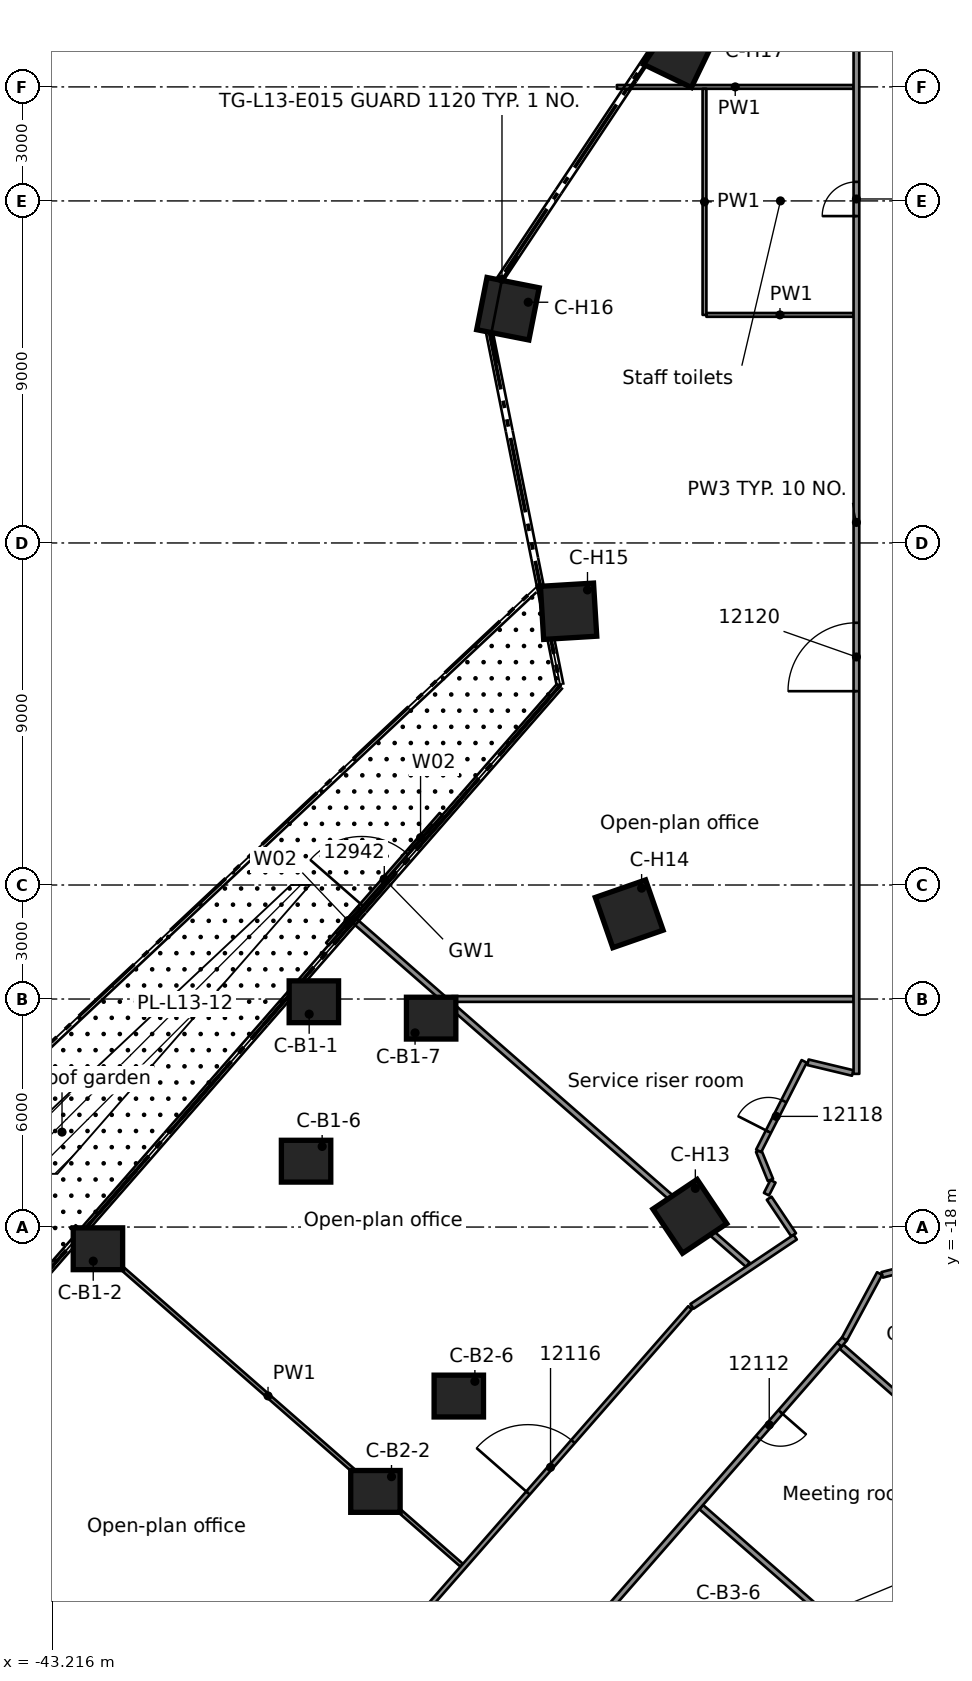
"""IFC4 building model, lengths in metres.
Left out: names, types, materials, properties, quantities, classifications, styles, units other than length and angle.
Written with IfcOpenShell. Run it as: python <this file> out.ifc"""

import sys

from ifc_helpers import new_model, si_unit, direction, frame, frame_2d, origin, origin_2d, place, context, subcontext, project, spatial, rectangle, extrude, element, fill, save


model = new_model("IFC4")
c1 = context("Model", 3, precision=1e-05, world=origin(), true_north=direction((0.0, 1.0)))
c2 = subcontext(c1, "Body", "Model", "MODEL_VIEW")
j1 = project(units=[si_unit("LENGTHUNIT", "METRE"), si_unit("PLANEANGLEUNIT", "RADIAN")], contexts=[c1])
p1 = place(None, origin())
s1 = spatial("IfcSite", under=j1, at=p1, CompositionType="ELEMENT")
p2 = place(p1, origin())
s2 = spatial("IfcBuilding", under=s1, at=p2, CompositionType="ELEMENT")
p3 = place(p2, frame((0.0, 0.0, 58.8)))
s3 = spatial("IfcBuildingStorey", under=s2, at=p3, CompositionType="ELEMENT", Elevation=58.8)
for number, where, z_axis, x_axis in (
    (1, (-36.327, -12.072, 0.0), (0.0, 0.0, 1.0), (1.0, 0.0, 0.0)),
    (2, (-42.009, -18.571, 0.0), (0.0, 0.0, 1.0), (1.0, 0.0, 0.0)),
    (3, (-36.532, -16.267, 0.0), (0.0, 0.0, 1.0), (1.0, 0.0, 0.0)),
    (4, (-33.241, -12.503, 0.0), (0.0, 0.0, 1.0), (1.0, 0.0, 0.0)),
    (5, (-34.707, -24.956, 0.0), (0.0, 0.0, 1.0), (1.0, 0.0, 0.0)),
    (6, (-32.513, -22.447, 0.0), (0.0, 0.0, 1.0), (1.0, 0.0, 0.0)),
):
    element("IfcColumn", number, at=place(p3, frame(where, z_axis=z_axis, x_axis=x_axis)), inside=s3, PredefinedType="COLUMN", context=c2, shape_type="SweptSolid", body=[
        extrude(rectangle(XDim=1.3, YDim=1.1, at=origin_2d()), origin(), (0.0, 0.0, 1.0), 3.5),
    ])
for number, where, z_axis, x_axis in (
    (7, (-26.434, -17.718, 0.0), (0.0, 0.0, 1.0), (-0.831, -0.557, 0.0)),
    (8, (-28.029, -9.758, 0.0), (0.0, 0.0, 1.0), (-0.944, -0.329, 0.0)),
    (9, (-29.624, -1.797, 0.0), (0.0, 0.0, 1.0), (-0.998, -0.061, 0.0)),
    (10, (-31.22, 6.163, 0.0), (0.0, 0.0, 1.0), (-0.981, 0.194, 0.0)),
    (11, (-26.719, 12.92, 0.0), (0.0, 0.0, 1.0), (-0.9, 0.435, 0.0)),
):
    element("IfcColumn", number, at=place(p3, frame(where, z_axis=z_axis, x_axis=x_axis)), inside=s3, PredefinedType="COLUMN", context=c2, shape_type="SweptSolid", body=[
        extrude(rectangle(XDim=1.4, YDim=1.4, at=origin_2d()), origin(), (0.0, 0.0, 1.0), 3.5),
    ])
p4 = place(p3, frame((-35.968, -10.553, 0.0), z_axis=(0.0, 0.0, 1.0), x_axis=(0.658272283298, 0.752779915408, 0.0)))
e12 = element("IfcWall", 12, at=p4, inside=s3, PredefinedType="STANDARD", context=c2, shape_type="SweptSolid", body=[
    extrude(rectangle(XDim=4.539, YDim=0.1, at=frame_2d((2.27, 0.0))), origin(), (0.0, 0.0, 1.0), 3.1),
])
p5 = place(p4, frame((1.369, 0.0, 0.0)))
e13 = element("IfcOpeningElement", 13, at=p5, cuts=e12, PredefinedType="OPENING", context=c2, shape_type="SweptSolid", body=[
    extrude(rectangle(XDim=1.8, YDim=2.4, at=frame_2d((0.9, 1.2))), frame((0.0, 0.06, 0.0), z_axis=(0.0, -1.0, 0.0), x_axis=(1.0, 0.0, 0.0)), (0.0, 0.0, 1.0), 0.12),
])
p6 = place(p4, frame((0.369, 0.0, 0.0)))
e14 = element("IfcOpeningElement", 14, at=p6, cuts=e12, PredefinedType="OPENING", context=c2, shape_type="SweptSolid", body=[
    extrude(rectangle(XDim=0.9, YDim=2.4, at=frame_2d((0.45, 1.2))), frame((0.0, 0.06, 0.0), z_axis=(0.0, -1.0, 0.0), x_axis=(1.0, 0.0, 0.0)), (0.0, 0.0, 1.0), 0.12),
])
p7 = place(p4, frame((3.269, 0.0, 0.0)))
e15 = element("IfcOpeningElement", 15, at=p7, cuts=e12, PredefinedType="OPENING", context=c2, shape_type="SweptSolid", body=[
    extrude(rectangle(XDim=0.9, YDim=2.4, at=frame_2d((0.45, 1.2))), frame((0.0, 0.06, 0.0), z_axis=(0.0, -1.0, 0.0), x_axis=(1.0, 0.0, 0.0)), (0.0, 0.0, 1.0), 0.12),
])
p8 = place(p3, frame((-24.346, -17.242, 0.0), z_axis=(0.0, 0.0, 1.0), x_axis=(0.55625636637, -0.831010742935, 0.0)))
e16 = element("IfcWall", 16, at=p8, inside=s3, PredefinedType="PARTITIONING", context=c2, shape_type="SweptSolid", body=[
    extrude(rectangle(XDim=1.158, YDim=0.15, at=frame_2d((0.579, 0.0))), origin(), (0.0, 0.0, 1.0), 3.08),
])
p9 = place(p3, frame((-48.313, -24.572, 0.0), z_axis=(0.0, 0.0, 1.0), x_axis=(0.752771849231, -0.658281507415, 0.0)))
e17 = element("IfcWall", 17, at=p9, inside=s3, PredefinedType="PARTITIONING", context=c2, shape_type="SweptSolid", body=[
    extrude(rectangle(XDim=13.482, YDim=0.1, at=frame_2d((6.741, 0.0))), origin(), (0.0, 0.0, 1.0), 3.08),
])
p10 = place(p3, frame((-42.628, -17.988, 0.0), z_axis=(0.0, 0.0, 1.0), x_axis=(0.752806813439, -0.658241522269, 0.0)))
e18 = element("IfcWall", 18, at=p10, inside=s3, PredefinedType="PARTITIONING", context=c2, shape_type="SweptSolid", body=[
    extrude(rectangle(XDim=13.536, YDim=0.1, at=frame_2d((6.768, 0.0))), origin(), (0.0, 0.0, 1.0), 3.08),
])
p11 = place(p3, frame((-26.134, -25.368, 0.0), z_axis=(0.0, 0.0, 1.0), x_axis=(0.75275458924, -0.6583012444, 0.0)))
e19 = element("IfcWall", 19, at=p11, inside=s3, PredefinedType="PARTITIONING", context=c2, shape_type="SweptSolid", body=[
    extrude(rectangle(XDim=5.95, YDim=0.15, at=frame_2d((2.975, 0.0))), origin(), (0.0, 0.0, 1.0), 3.08),
])
p12 = place(p3, frame((-35.281, -9.921, 0.0), z_axis=(0.0, 0.0, 1.0), x_axis=(0.752809357725, -0.658238612452, 0.0)))
e20 = element("IfcWall", 20, at=p12, inside=s3, PredefinedType="PARTITIONING", context=c2, shape_type="SweptSolid", body=[
    extrude(rectangle(XDim=13.778, YDim=0.15, at=frame_2d((6.889, 0.0))), origin(), (0.0, 0.0, 1.0), 3.08),
])
p13 = place(p3, frame((-22.444, -21.147, 0.0), z_axis=(0.0, 0.0, 1.0), x_axis=(0.75277438398, -0.658278608815, 0.0)))
e21 = element("IfcWall", 21, at=p13, inside=s3, PredefinedType="PARTITIONING", context=c2, shape_type="SweptSolid", body=[
    extrude(rectangle(XDim=5.431, YDim=0.15, at=frame_2d((2.715, 0.0))), origin(), (0.0, 0.0, 1.0), 3.08),
])
p14 = place(p3, frame((-24.623, -15.996, 0.0), z_axis=(0.0, 0.0, 1.0), x_axis=(0.376274056367, -0.92650841038, 0.0)))
e22 = element("IfcWall", 22, at=p14, inside=s3, PredefinedType="PARTITIONING", context=c2, shape_type="SweptSolid", body=[
    extrude(rectangle(XDim=0.827, YDim=0.15, at=frame_2d((0.413, 0.0))), origin(), (0.0, 0.0, 1.0), 3.08),
])
p15 = place(p3, frame((-21.373, -19.258, 0.0), z_axis=(0.0, 0.0, 1.0), x_axis=(0.96864217239, 0.248459940165, 0.0)))
e23 = element("IfcWall", 23, at=p15, inside=s3, PredefinedType="PARTITIONING", context=c2, shape_type="SweptSolid", body=[
    extrude(rectangle(XDim=0.833, YDim=0.15, at=frame_2d((0.417, 0.0))), origin(), (0.0, 0.0, 1.0), 3.08),
])
p16 = place(p3, frame((-23.325, -13.664, 0.0), z_axis=(0.0, 0.0, 1.0), x_axis=(0.972436756549, -0.233166795477, 0.0)))
e24 = element("IfcWall", 24, at=p16, inside=s3, PredefinedType="PARTITIONING", context=c2, shape_type="SweptSolid", body=[
    extrude(rectangle(XDim=1.209, YDim=0.15, at=frame_2d((0.605, 0.0))), origin(), (0.0, 0.0, 1.0), 3.08),
])
p17 = place(p3, frame((-32.705, -12.0, 0.0), z_axis=(0.0, 0.0, 1.0), x_axis=(1.0, 0.0, 0.0)))
e25 = element("IfcWall", 25, at=p17, inside=s3, PredefinedType="PARTITIONING", context=c2, shape_type="SweptSolid", body=[
    extrude(rectangle(XDim=10.58, YDim=0.15, at=frame_2d((5.29, 0.0))), origin(), (0.0, 0.0, 1.0), 3.08),
])
p18 = place(p3, frame((-25.998, 6.001, 0.0), z_axis=(0.0, 0.0, 1.0), x_axis=(1.0, 0.0, 0.0)))
e26 = element("IfcWall", 26, at=p18, inside=s3, PredefinedType="PARTITIONING", context=c2, shape_type="SweptSolid", body=[
    extrude(rectangle(XDim=3.873, YDim=0.1, at=frame_2d((1.937, 0.0))), origin(), (0.0, 0.0, 1.0), 3.08),
])
p19 = place(p3, frame((-28.353, 12.0, 0.0), z_axis=(0.0, 0.0, 1.0), x_axis=(1.0, 0.0, 0.0)))
e27 = element("IfcWall", 27, at=p19, inside=s3, PredefinedType="PARTITIONING", context=c2, shape_type="SweptSolid", body=[
    extrude(rectangle(XDim=6.228, YDim=0.1, at=frame_2d((3.114, 0.0))), origin(), (0.0, 0.0, 1.0), 3.08),
])
p20 = place(p3, frame((-26.377, -20.087, 0.0), z_axis=(0.0, 0.0, 1.0), x_axis=(0.830715782385, 0.55669676566, 0.0)))
e28 = element("IfcWall", 28, at=p20, inside=s3, PredefinedType="PARTITIONING", context=c2, shape_type="SweptSolid", body=[
    extrude(rectangle(XDim=3.271, YDim=0.15, at=frame_2d((1.635, 0.0))), origin(), (0.0, 0.0, 1.0), 3.08),
])
p21 = place(p3, frame((-15.416, -27.733, 0.0), z_axis=(0.0, 0.0, 1.0), x_axis=(-0.658232849435, -0.75281439673, 0.0)))
e29 = element("IfcWall", 29, at=p21, inside=s3, PredefinedType="PARTITIONING", context=c2, shape_type="SweptSolid", body=[
    extrude(rectangle(XDim=19.274, YDim=0.125, at=frame_2d((9.637, 0.0))), origin(), (0.0, 0.0, 1.0), 3.08),
])
p22 = place(p21, frame((1.351, 0.0, 0.0)))
e30 = element("IfcOpeningElement", 30, at=p22, cuts=e29, PredefinedType="OPENING", context=c2, shape_type="SweptSolid", body=[
    extrude(rectangle(XDim=0.9, YDim=2.1, at=frame_2d((0.45, 1.05))), frame((0.0, 0.073, 0.0), z_axis=(0.0, -1.0, 0.0), x_axis=(1.0, 0.0, 0.0)), (0.0, 0.0, 1.0), 0.145),
])
p23 = place(p21, frame((14.425, 0.0, 0.0)))
e31 = element("IfcOpeningElement", 31, at=p23, cuts=e29, PredefinedType="OPENING", context=c2, shape_type="SweptSolid", body=[
    extrude(rectangle(XDim=0.9, YDim=2.1, at=frame_2d((0.45, 1.05))), frame((0.0, 0.073, 0.0), z_axis=(0.0, -1.0, 0.0), x_axis=(1.0, 0.0, 0.0)), (0.0, 0.0, 1.0), 0.145),
])
p24 = place(p3, frame((-30.815, -39.873, 0.0), z_axis=(0.0, 0.0, 1.0), x_axis=(0.658330873818, 0.752728676601, 0.0)))
e32 = element("IfcWall", 32, at=p24, inside=s3, PredefinedType="PARTITIONING", context=c2, shape_type="SweptSolid", body=[
    extrude(rectangle(XDim=18.805, YDim=0.15, at=frame_2d((9.402, 0.0))), origin(), (0.0, 0.0, 1.0), 3.08),
])
p25 = place(p24, frame((11.778, 0.0, 0.0)))
e33 = element("IfcOpeningElement", 33, at=p25, cuts=e32, PredefinedType="OPENING", context=c2, shape_type="SweptSolid", body=[
    extrude(rectangle(XDim=0.9, YDim=2.1, at=frame_2d((0.45, 1.05))), frame((0.0, 0.085, 0.0), z_axis=(0.0, -1.0, 0.0), x_axis=(1.0, 0.0, 0.0)), (0.0, 0.0, 1.0), 0.17),
])
p26 = place(p3, frame((-22.5, -21.098, 0.0), z_axis=(0.0, 0.0, 1.0), x_axis=(0.659354460112, 0.751832225919, 0.0)))
e34 = element("IfcWall", 34, at=p26, inside=s3, PredefinedType="PARTITIONING", context=c2, shape_type="SweptSolid", body=[
    extrude(rectangle(XDim=0.203, YDim=0.15, at=frame_2d((0.102, 0.0))), origin(), (0.0, 0.0, 1.0), 3.08),
])
p27 = place(p3, frame((-22.501, -21.097, 0.0), z_axis=(0.0, 0.0, 1.0), x_axis=(-0.658166451888, -0.752872447104, 0.0)))
e35 = element("IfcWall", 35, at=p27, inside=s3, PredefinedType="PARTITIONING", context=c2, shape_type="SweptSolid", body=[
    extrude(rectangle(XDim=19.427, YDim=0.15, at=frame_2d((9.713, 0.0))), origin(), (0.0, 0.0, 1.0), 3.08),
])
p28 = place(p27, frame((2.35, 0.0, 0.0)))
e36 = element("IfcOpeningElement", 36, at=p28, cuts=e35, PredefinedType="OPENING", context=c2, shape_type="SweptSolid", body=[
    extrude(rectangle(XDim=0.9, YDim=2.1, at=frame_2d((0.45, 1.05))), frame((0.0, 0.085, 0.0), z_axis=(0.0, -1.0, 0.0), x_axis=(1.0, 0.0, 0.0)), (0.0, 0.0, 1.0), 0.17),
])
p29 = place(p27, frame((14.757, 0.0, 0.0)))
e37 = element("IfcOpeningElement", 37, at=p29, cuts=e35, PredefinedType="OPENING", context=c2, shape_type="SweptSolid", body=[
    extrude(rectangle(XDim=0.9, YDim=2.1, at=frame_2d((0.45, 1.05))), frame((0.0, 0.085, 0.0), z_axis=(0.0, -1.0, 0.0), x_axis=(1.0, 0.0, 0.0)), (0.0, 0.0, 1.0), 0.17),
])
p30 = place(p3, frame((-41.737, -37.628, 0.0), z_axis=(0.0, 0.0, 1.0), x_axis=(0.658317287272, 0.752740559076, 0.0)))
e38 = element("IfcWall", 38, at=p30, inside=s3, PredefinedType="PARTITIONING", context=c2, shape_type="SweptSolid", body=[
    extrude(rectangle(XDim=23.255, YDim=0.125, at=frame_2d((11.627, 0.0))), origin(), (0.0, 0.0, 1.0), 3.08),
])
p31 = place(p30, frame((16.778, 0.0, 0.0)))
e39 = element("IfcOpeningElement", 39, at=p31, cuts=e38, PredefinedType="OPENING", context=c2, shape_type="SweptSolid", body=[
    extrude(rectangle(XDim=1.8, YDim=2.1, at=frame_2d((0.9, 1.05))), frame((0.0, 0.073, 0.0), z_axis=(0.0, -1.0, 0.0), x_axis=(1.0, 0.0, 0.0)), (0.0, 0.0, 1.0), 0.145),
])
p32 = place(p30, frame((9.35, 0.0, 0.0)))
e40 = element("IfcOpeningElement", 40, at=p32, cuts=e38, PredefinedType="OPENING", context=c2, shape_type="SweptSolid", body=[
    extrude(rectangle(XDim=1.1, YDim=2.1, at=frame_2d((0.55, 1.05))), frame((0.0, 0.073, 0.0), z_axis=(0.0, -1.0, 0.0), x_axis=(1.0, 0.0, 0.0)), (0.0, 0.0, 1.0), 0.145),
])
p33 = place(p3, frame((-22.366, -20.945, 0.0), z_axis=(0.0, 0.0, 1.0), x_axis=(0.473846511914, 0.880607451221, 0.0)))
e41 = element("IfcWall", 41, at=p33, inside=s3, PredefinedType="PARTITIONING", context=c2, shape_type="SweptSolid", body=[
    extrude(rectangle(XDim=1.954, YDim=0.15, at=frame_2d((0.977, 0.0))), origin(), (0.0, 0.0, 1.0), 3.08),
])
p34 = place(p3, frame((-24.623, -15.996, 0.0), z_axis=(0.0, 0.0, 1.0), x_axis=(0.453225530358, 0.891395882104, 0.0)))
e42 = element("IfcWall", 42, at=p34, inside=s3, PredefinedType="PARTITIONING", context=c2, shape_type="SweptSolid", body=[
    extrude(rectangle(XDim=2.643, YDim=0.15, at=frame_2d((1.322, 0.0))), origin(), (0.0, 0.0, 1.0), 3.08),
])
p35 = place(p34, frame((0.569, 0.0, 0.0)))
e43 = element("IfcOpeningElement", 43, at=p35, cuts=e42, PredefinedType="OPENING", context=c2, shape_type="SweptSolid", body=[
    extrude(rectangle(XDim=0.9, YDim=2.1, at=frame_2d((0.45, 1.05))), frame((0.0, 0.085, 0.0), z_axis=(0.0, -1.0, 0.0), x_axis=(1.0, 0.0, 0.0)), (0.0, 0.0, 1.0), 0.17),
])
p36 = place(p3, frame((-24.417, -17.135, 0.0), z_axis=(0.0, 0.0, 1.0), x_axis=(0.452087427058, 0.891973630942, 0.0)))
e44 = element("IfcWall", 44, at=p36, inside=s3, PredefinedType="PARTITIONING", context=c2, shape_type="SweptSolid", body=[
    extrude(rectangle(XDim=0.38, YDim=0.15, at=frame_2d((0.19, 0.0))), origin(), (0.0, 0.0, 1.0), 3.08),
])
p37 = place(p3, frame((-22.05, -13.969, 0.0), z_axis=(0.0, 0.0, 1.0), x_axis=(0.0, 1.0, 0.0)))
e45 = element("IfcWall", 45, at=p37, inside=s3, PredefinedType="PARTITIONING", context=c2, shape_type="SweptSolid", body=[
    extrude(rectangle(XDim=29.02, YDim=0.15, at=frame_2d((14.51, 0.0))), origin(), (0.0, 0.0, 1.0), 3.08),
])
p38 = place(p37, frame((10.069, 0.0, 0.0)))
e46 = element("IfcOpeningElement", 46, at=p38, cuts=e45, PredefinedType="OPENING", context=c2, shape_type="SweptSolid", body=[
    extrude(rectangle(XDim=1.8, YDim=2.1, at=frame_2d((0.9, 1.05))), frame((0.0, 0.085, 0.0), z_axis=(0.0, -1.0, 0.0), x_axis=(1.0, 0.0, 0.0)), (0.0, 0.0, 1.0), 0.17),
])
p39 = place(p37, frame((22.57, 0.0, 0.0)))
e47 = element("IfcOpeningElement", 47, at=p39, cuts=e45, PredefinedType="OPENING", context=c2, shape_type="SweptSolid", body=[
    extrude(rectangle(XDim=0.9, YDim=2.1, at=frame_2d((0.45, 1.05))), frame((0.0, 0.085, 0.0), z_axis=(0.0, -1.0, 0.0), x_axis=(1.0, 0.0, 0.0)), (0.0, 0.0, 1.0), 0.17),
])
p40 = place(p3, frame((-26.048, 6.001, 0.0), z_axis=(0.0, 0.0, 1.0), x_axis=(0.0, 1.0, 0.0)))
e48 = element("IfcWall", 48, at=p40, inside=s3, PredefinedType="PARTITIONING", context=c2, shape_type="SweptSolid", body=[
    extrude(rectangle(XDim=5.949, YDim=0.1, at=frame_2d((2.975, 0.0))), origin(), (0.0, 0.0, 1.0), 3.08),
])
p41 = place(p5, origin())
e49 = element("IfcDoor", 49, at=p41, inside=s3, OperationType="DOUBLE_DOOR_SINGLE_SWING", PredefinedType="DOOR", context=c2, shape_type="SweptSolid", body=[
    extrude(rectangle(XDim=1.8, YDim=2.4, at=frame_2d((0.9, 1.2))), frame((0.0, 0.025, 0.0), z_axis=(0.0, -1.0, 0.0), x_axis=(1.0, 0.0, 0.0)), (0.0, 0.0, 1.0), 0.05),
])
fill(e13, e49)
p42 = place(p6, origin())
e50 = element("IfcWindow", 50, at=p42, inside=s3, PartitioningType="SINGLE_PANEL", PredefinedType="WINDOW", context=c2, shape_type="SweptSolid", body=[
    extrude(rectangle(XDim=0.9, YDim=2.4, at=frame_2d((0.45, 1.2))), frame((0.0, 0.03, 0.0), z_axis=(0.0, -1.0, 0.0), x_axis=(1.0, 0.0, 0.0)), (0.0, 0.0, 1.0), 0.06),
])
fill(e14, e50)
p43 = place(p7, origin())
e51 = element("IfcWindow", 51, at=p43, inside=s3, PartitioningType="SINGLE_PANEL", PredefinedType="WINDOW", context=c2, shape_type="SweptSolid", body=[
    extrude(rectangle(XDim=0.9, YDim=2.4, at=frame_2d((0.45, 1.2))), frame((0.0, 0.03, 0.0), z_axis=(0.0, -1.0, 0.0), x_axis=(1.0, 0.0, 0.0)), (0.0, 0.0, 1.0), 0.06),
])
fill(e15, e51)
p44 = place(p28, origin())
e52 = element("IfcDoor", 52, at=p44, inside=s3, OperationType="SINGLE_SWING_LEFT", PredefinedType="DOOR", context=c2, shape_type="SweptSolid", body=[
    extrude(rectangle(XDim=0.9, YDim=2.1, at=frame_2d((0.45, 1.05))), frame((0.0, 0.025, 0.0), z_axis=(0.0, -1.0, 0.0), x_axis=(1.0, 0.0, 0.0)), (0.0, 0.0, 1.0), 0.05),
])
fill(e36, e52)
p45 = place(p31, origin())
e53 = element("IfcDoor", 53, at=p45, inside=s3, OperationType="DOUBLE_DOOR_SINGLE_SWING", PredefinedType="DOOR", context=c2, shape_type="SweptSolid", body=[
    extrude(rectangle(XDim=1.8, YDim=2.1, at=frame_2d((0.9, 1.05))), frame((0.0, 0.025, 0.0), z_axis=(0.0, -1.0, 0.0), x_axis=(1.0, 0.0, 0.0)), (0.0, 0.0, 1.0), 0.05),
])
fill(e39, e53)
p46 = place(p35, origin())
e54 = element("IfcDoor", 54, at=p46, inside=s3, OperationType="SINGLE_SWING_LEFT", PredefinedType="DOOR", context=c2, shape_type="SweptSolid", body=[
    extrude(rectangle(XDim=0.9, YDim=2.1, at=frame_2d((0.45, 1.05))), frame((0.0, 0.025, 0.0), z_axis=(0.0, -1.0, 0.0), x_axis=(1.0, 0.0, 0.0)), (0.0, 0.0, 1.0), 0.05),
])
fill(e43, e54)
p47 = place(p38, origin())
e55 = element("IfcDoor", 55, at=p47, inside=s3, OperationType="DOUBLE_DOOR_SINGLE_SWING", PredefinedType="DOOR", context=c2, shape_type="SweptSolid", body=[
    extrude(rectangle(XDim=1.8, YDim=2.1, at=frame_2d((0.9, 1.05))), frame((0.0, 0.025, 0.0), z_axis=(0.0, -1.0, 0.0), x_axis=(1.0, 0.0, 0.0)), (0.0, 0.0, 1.0), 0.05),
])
fill(e46, e55)
p48 = place(p39, origin())
e56 = element("IfcDoor", 56, at=p48, inside=s3, OperationType="SINGLE_SWING_RIGHT", PredefinedType="DOOR", context=c2, shape_type="SweptSolid", body=[
    extrude(rectangle(XDim=0.9, YDim=2.1, at=frame_2d((0.45, 1.05))), frame((0.0, 0.025, 0.0), z_axis=(0.0, -1.0, 0.0), x_axis=(1.0, 0.0, 0.0)), (0.0, 0.0, 1.0), 0.05),
])
fill(e47, e56)
save(model, sys.argv[1])
